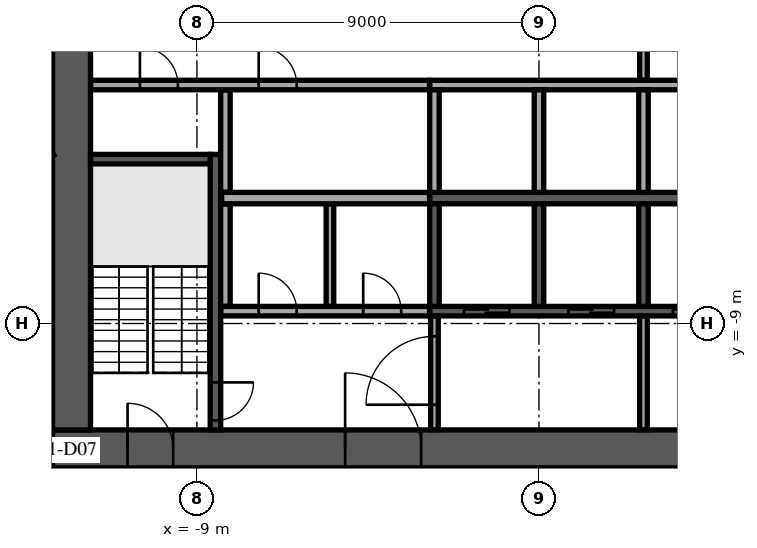
"""IFC4 building model, lengths in metres.
Left out: names, types, materials, properties, quantities, classifications, styles, units other than length and angle.
Written with IfcOpenShell. Run it as: python <this file> out.ifc"""

import sys

from ifc_helpers import new_model, si_unit, direction, frame, frame_2d, origin, place, context, subcontext, project, spatial, rectangle, extrude, element, fill, save


model = new_model("IFC4")
c1 = context("Model", 3, precision=1e-05, world=origin(), true_north=direction((0.0, 1.0)))
c2 = subcontext(c1, "Body", "Model", "MODEL_VIEW")
j1 = project(units=[si_unit("LENGTHUNIT", "METRE"), si_unit("PLANEANGLEUNIT", "RADIAN")], contexts=[c1])
p1 = place(None, origin())
s1 = spatial("IfcSite", under=j1, at=p1, CompositionType="ELEMENT")
p2 = place(p1, origin())
s2 = spatial("IfcBuilding", under=s1, at=p2, CompositionType="ELEMENT")
p3 = place(p2, frame((0.0, 0.0, 139.7)))
s3 = spatial("IfcBuildingStorey", under=s2, at=p3, CompositionType="ELEMENT", Elevation=139.7)
p4 = place(p3, frame((-12.8, -12.3, 0.0), z_axis=(0.0, 0.0, 1.0), x_axis=(1.0, 0.0, 0.0)))
e1 = element("IfcWall", 1, at=p4, inside=s3, PredefinedType="SHEAR", context=c2, shape_type="SweptSolid", body=[
    extrude(rectangle(XDim=25.6, YDim=1.0, at=frame_2d((12.8, 0.0))), origin(), (0.0, 0.0, 1.0), 3.6),
])
p5 = place(p4, frame((7.7, 0.0, 0.0)))
e2 = element("IfcOpeningElement", 2, at=p5, cuts=e1, PredefinedType="OPENING", context=c2, shape_type="SweptSolid", body=[
    extrude(rectangle(XDim=2.0, YDim=2.1, at=frame_2d((1.0, 1.05))), frame((0.0, 0.51, 0.0), z_axis=(0.0, -1.0, 0.0), x_axis=(1.0, 0.0, 0.0)), (0.0, 0.0, 1.0), 1.02),
])
p6 = place(p4, frame((17.825, 0.0, 0.0)))
e3 = element("IfcOpeningElement", 3, at=p6, cuts=e1, PredefinedType="OPENING", context=c2, shape_type="SweptSolid", body=[
    extrude(rectangle(XDim=1.2, YDim=2.1, at=frame_2d((0.6, 1.05))), frame((0.0, 0.51, 0.0), z_axis=(0.0, -1.0, 0.0), x_axis=(1.0, 0.0, 0.0)), (0.0, 0.0, 1.0), 1.02),
])
p7 = place(p4, frame((1.975, 0.0, 0.0)))
e4 = element("IfcOpeningElement", 4, at=p7, cuts=e1, PredefinedType="OPENING", context=c2, shape_type="SweptSolid", body=[
    extrude(rectangle(XDim=1.2, YDim=2.1, at=frame_2d((0.6, 1.05))), frame((0.0, 0.51, 0.0), z_axis=(0.0, -1.0, 0.0), x_axis=(1.0, 0.0, 0.0)), (0.0, 0.0, 1.0), 1.02),
])
p8 = place(p4, frame((22.425, 0.0, 0.0)))
e5 = element("IfcOpeningElement", 5, at=p8, cuts=e1, PredefinedType="OPENING", context=c2, shape_type="SweptSolid", body=[
    extrude(rectangle(XDim=1.2, YDim=2.1, at=frame_2d((0.6, 1.05))), frame((0.0, 0.51, 0.0), z_axis=(0.0, -1.0, 0.0), x_axis=(1.0, 0.0, 0.0)), (0.0, 0.0, 1.0), 1.02),
])
p9 = place(p3, frame((-12.3, -11.8, 0.0), z_axis=(0.0, 0.0, 1.0), x_axis=(0.0, 1.0, 0.0)))
e6 = element("IfcWall", 6, at=p9, inside=s3, PredefinedType="SHEAR", context=c2, shape_type="SweptSolid", body=[
    extrude(rectangle(XDim=23.6, YDim=1.0, at=frame_2d((11.8, 0.0))), origin(), (0.0, 0.0, 1.0), 3.6),
])
p10 = place(p9, frame((10.6, 0.0, 0.0)))
e7 = element("IfcOpeningElement", 7, at=p10, cuts=e6, PredefinedType="OPENING", context=c2, shape_type="SweptSolid", body=[
    extrude(rectangle(XDim=2.4, YDim=2.4, at=frame_2d((1.2, 1.2))), frame((0.0, 0.51, 0.0), z_axis=(0.0, -1.0, 0.0), x_axis=(1.0, 0.0, 0.0)), (0.0, 0.0, 1.0), 1.02),
])
p11 = place(p3, frame((-2.875, -5.7, 0.0), z_axis=(0.0, 0.0, 1.0), x_axis=(1.0, 0.0, 0.0)))
e8 = element("IfcWall", 8, at=p11, inside=s3, PredefinedType="SOLIDWALL", context=c2, shape_type="SweptSolid", body=[
    extrude(rectangle(XDim=11.25, YDim=0.3, at=frame_2d((5.625, 0.0))), origin(), (0.0, 0.0, 1.0), 3.6),
])
p12 = place(p3, frame((-2.875, -2.725, 0.0), z_axis=(0.0, 0.0, 1.0), x_axis=(1.0, 0.0, 0.0)))
e9 = element("IfcWall", 9, at=p12, inside=s3, PredefinedType="SOLIDWALL", context=c2, shape_type="SweptSolid", body=[
    extrude(rectangle(XDim=8.5, YDim=0.25, at=frame_2d((4.25, 0.0))), origin(), (0.0, 0.0, 1.0), 3.6),
])
for number, where, z_axis, x_axis in (
    (10, (-2.75, -5.55, 0.0), (0.0, 0.0, 1.0), (0.0, 1.0, 0.0)),
    (11, (0.0, -5.55, 0.0), (0.0, 0.0, 1.0), (0.0, 1.0, 0.0)),
    (12, (2.75, -5.55, 0.0), (0.0, 0.0, 1.0), (0.0, 1.0, 0.0)),
):
    element("IfcWall", number, at=place(p3, frame(where, z_axis=z_axis, x_axis=x_axis)), inside=s3, PredefinedType="SOLIDWALL", context=c2, shape_type="SweptSolid", body=[
        extrude(rectangle(XDim=2.7, YDim=0.25, at=frame_2d((1.35, 0.0))), origin(), (0.0, 0.0, 1.0), 3.6),
    ])
p13 = place(p3, frame((-2.875, -8.675, 0.0), z_axis=(0.0, 0.0, 1.0), x_axis=(1.0, 0.0, 0.0)))
e13 = element("IfcWall", 13, at=p13, inside=s3, PredefinedType="SOLIDWALL", context=c2, shape_type="SweptSolid", body=[
    extrude(rectangle(XDim=11.25, YDim=0.25, at=frame_2d((5.625, 0.0))), origin(), (0.0, 0.0, 1.0), 3.6),
])
p14 = place(p13, frame((0.9, 0.0, 0.0)))
e14 = element("IfcOpeningElement", 14, at=p14, cuts=e13, PredefinedType="OPENING", context=c2, shape_type="SweptSolid", body=[
    extrude(rectangle(XDim=1.2, YDim=2.1, at=frame_2d((0.6, 1.05))), frame((0.0, 0.135, 0.0), z_axis=(0.0, -1.0, 0.0), x_axis=(1.0, 0.0, 0.0)), (0.0, 0.0, 1.0), 0.27),
])
p15 = place(p13, frame((3.65, 0.0, 0.0)))
e15 = element("IfcOpeningElement", 15, at=p15, cuts=e13, PredefinedType="OPENING", context=c2, shape_type="SweptSolid", body=[
    extrude(rectangle(XDim=1.2, YDim=2.1, at=frame_2d((0.6, 1.05))), frame((0.0, 0.135, 0.0), z_axis=(0.0, -1.0, 0.0), x_axis=(1.0, 0.0, 0.0)), (0.0, 0.0, 1.0), 0.27),
])
p16 = place(p13, frame((6.4, 0.0, 0.0)))
e16 = element("IfcOpeningElement", 16, at=p16, cuts=e13, PredefinedType="OPENING", context=c2, shape_type="SweptSolid", body=[
    extrude(rectangle(XDim=1.2, YDim=2.1, at=frame_2d((0.6, 1.05))), frame((0.0, 0.135, 0.0), z_axis=(0.0, -1.0, 0.0), x_axis=(1.0, 0.0, 0.0)), (0.0, 0.0, 1.0), 0.27),
])
p17 = place(p13, frame((9.15, 0.0, 0.0)))
e17 = element("IfcOpeningElement", 17, at=p17, cuts=e13, PredefinedType="OPENING", context=c2, shape_type="SweptSolid", body=[
    extrude(rectangle(XDim=1.2, YDim=2.1, at=frame_2d((0.6, 1.05))), frame((0.0, 0.135, 0.0), z_axis=(0.0, -1.0, 0.0), x_axis=(1.0, 0.0, 0.0)), (0.0, 0.0, 1.0), 0.27),
])
for number, where, z_axis, x_axis in (
    (18, (-2.75, -8.55, 0.0), (0.0, 0.0, 1.0), (0.0, 1.0, 0.0)),
    (19, (0.0, -8.55, 0.0), (0.0, 0.0, 1.0), (0.0, 1.0, 0.0)),
    (20, (2.75, -8.55, 0.0), (0.0, 0.0, 1.0), (0.0, 1.0, 0.0)),
):
    element("IfcWall", number, at=place(p3, frame(where, z_axis=z_axis, x_axis=x_axis)), inside=s3, PredefinedType="SOLIDWALL", context=c2, shape_type="SweptSolid", body=[
        extrude(rectangle(XDim=2.7, YDim=0.25, at=frame_2d((1.35, 0.0))), origin(), (0.0, 0.0, 1.0), 3.6),
    ])
p18 = place(p3, frame((-8.512, -4.55, 0.0), z_axis=(0.0, 0.0, 1.0), x_axis=(0.0, -1.0, 0.0)))
e21 = element("IfcWall", 21, at=p18, inside=s3, PredefinedType="SOLIDWALL", context=c2, shape_type="SweptSolid", body=[
    extrude(rectangle(XDim=7.25, YDim=0.275, at=frame_2d((3.625, 0.0))), origin(), (0.0, 0.0, 1.0), 3.6),
])
p19 = place(p18, frame((6.0, 0.0, 0.0)))
e22 = element("IfcOpeningElement", 22, at=p19, cuts=e21, PredefinedType="OPENING", context=c2, shape_type="SweptSolid", body=[
    extrude(rectangle(XDim=1.0, YDim=2.1, at=frame_2d((0.5, 1.05))), frame((0.0, 0.147, 0.0), z_axis=(0.0, -1.0, 0.0), x_axis=(1.0, 0.0, 0.0)), (0.0, 0.0, 1.0), 0.295),
])
p20 = place(p3, frame((-8.65, -4.675, 0.0), z_axis=(0.0, 0.0, 1.0), x_axis=(-1.0, 0.0, 0.0)))
e23 = element("IfcWall", 23, at=p20, inside=s3, PredefinedType="SOLIDWALL", context=c2, shape_type="SweptSolid", body=[
    extrude(rectangle(XDim=3.15, YDim=0.25, at=frame_2d((1.575, 0.0))), origin(), (0.0, 0.0, 1.0), 3.6),
])
p21 = place(p3, frame((-2.75, -11.795, 0.0), z_axis=(0.0, 0.0, 1.0), x_axis=(0.0, 1.0, 0.0)))
e24 = element("IfcWall", 24, at=p21, inside=s3, PredefinedType="PARTITIONING", context=c2, shape_type="SweptSolid", body=[
    extrude(rectangle(XDim=2.99, YDim=0.2, at=frame_2d((1.495, 0.0))), origin(), (0.0, 0.0, 1.0), 3.6),
])
p22 = place(p21, frame((0.657, 0.0, 0.0)))
e25 = element("IfcOpeningElement", 25, at=p22, cuts=e24, PredefinedType="OPENING", context=c2, shape_type="SweptSolid", body=[
    extrude(rectangle(XDim=1.8, YDim=2.1, at=frame_2d((0.9, 1.05))), frame((0.0, 0.11, 0.0), z_axis=(0.0, -1.0, 0.0), x_axis=(1.0, 0.0, 0.0)), (0.0, 0.0, 1.0), 0.22),
])
p23 = place(p3, frame((2.75, -11.795, 0.0), z_axis=(0.0, 0.0, 1.0), x_axis=(0.0, 1.0, 0.0)))
e26 = element("IfcWall", 26, at=p23, inside=s3, PredefinedType="PARTITIONING", context=c2, shape_type="SweptSolid", body=[
    extrude(rectangle(XDim=2.99, YDim=0.2, at=frame_2d((1.495, 0.0))), origin(), (0.0, 0.0, 1.0), 3.6),
])
p24 = place(p3, frame((-8.37, -8.675, 0.0), z_axis=(0.0, 0.0, 1.0), x_axis=(1.0, 0.0, 0.0)))
e27 = element("IfcWall", 27, at=p24, inside=s3, PredefinedType="PARTITIONING", context=c2, shape_type="SweptSolid", body=[
    extrude(rectangle(XDim=5.49, YDim=0.25, at=frame_2d((2.745, 0.0))), origin(), (0.0, 0.0, 1.0), 3.6),
])
p25 = place(p24, frame((0.995, 0.0, 0.0)))
e28 = element("IfcOpeningElement", 28, at=p25, cuts=e27, PredefinedType="OPENING", context=c2, shape_type="SweptSolid", body=[
    extrude(rectangle(XDim=1.0, YDim=2.1, at=frame_2d((0.5, 1.05))), frame((0.0, 0.135, 0.0), z_axis=(0.0, -1.0, 0.0), x_axis=(1.0, 0.0, 0.0)), (0.0, 0.0, 1.0), 0.27),
])
p26 = place(p24, frame((3.745, 0.0, 0.0)))
e29 = element("IfcOpeningElement", 29, at=p26, cuts=e27, PredefinedType="OPENING", context=c2, shape_type="SweptSolid", body=[
    extrude(rectangle(XDim=1.0, YDim=2.1, at=frame_2d((0.5, 1.05))), frame((0.0, 0.135, 0.0), z_axis=(0.0, -1.0, 0.0), x_axis=(1.0, 0.0, 0.0)), (0.0, 0.0, 1.0), 0.27),
])
p27 = place(p3, frame((-8.25, -8.545, 0.0), z_axis=(0.0, 0.0, 1.0), x_axis=(0.0, 1.0, 0.0)))
e30 = element("IfcWall", 30, at=p27, inside=s3, PredefinedType="PARTITIONING", context=c2, shape_type="SweptSolid", body=[
    extrude(rectangle(XDim=2.69, YDim=0.25, at=frame_2d((1.345, 0.0))), origin(), (0.0, 0.0, 1.0), 3.6),
])
p28 = place(p3, frame((-5.5, -8.545, 0.0), z_axis=(0.0, 0.0, 1.0), x_axis=(0.0, 1.0, 0.0)))
e31 = element("IfcWall", 31, at=p28, inside=s3, PredefinedType="PARTITIONING", context=c2, shape_type="SweptSolid", body=[
    extrude(rectangle(XDim=2.69, YDim=0.2, at=frame_2d((1.345, 0.0))), origin(), (0.0, 0.0, 1.0), 3.6),
])
p29 = place(p3, frame((-8.35, -5.7, 0.0), z_axis=(0.0, 0.0, 1.0), x_axis=(1.0, 0.0, 0.0)))
e32 = element("IfcWall", 32, at=p29, inside=s3, PredefinedType="PARTITIONING", context=c2, shape_type="SweptSolid", body=[
    extrude(rectangle(XDim=5.47, YDim=0.3, at=frame_2d((2.735, 0.0))), origin(), (0.0, 0.0, 1.0), 3.6),
])
p30 = place(p3, frame((-8.25, -5.545, 0.0), z_axis=(0.0, 0.0, 1.0), x_axis=(0.0, 1.0, 0.0)))
e33 = element("IfcWall", 33, at=p30, inside=s3, PredefinedType="PARTITIONING", context=c2, shape_type="SweptSolid", body=[
    extrude(rectangle(XDim=2.69, YDim=0.25, at=frame_2d((1.345, 0.0))), origin(), (0.0, 0.0, 1.0), 3.6),
])
p31 = place(p3, frame((-11.795, -2.725, 0.0), z_axis=(0.0, 0.0, 1.0), x_axis=(1.0, 0.0, 0.0)))
e34 = element("IfcWall", 34, at=p31, inside=s3, PredefinedType="PARTITIONING", context=c2, shape_type="SweptSolid", body=[
    extrude(rectangle(XDim=8.915, YDim=0.25, at=frame_2d((4.458, 0.0))), origin(), (0.0, 0.0, 1.0), 3.6),
])
p32 = place(p31, frame((1.295, 0.0, 0.0)))
e35 = element("IfcOpeningElement", 35, at=p32, cuts=e34, PredefinedType="OPENING", context=c2, shape_type="SweptSolid", body=[
    extrude(rectangle(XDim=1.0, YDim=2.1, at=frame_2d((0.5, 1.05))), frame((0.0, 0.135, 0.0), z_axis=(0.0, -1.0, 0.0), x_axis=(1.0, 0.0, 0.0)), (0.0, 0.0, 1.0), 0.27),
])
p33 = place(p31, frame((4.42, 0.0, 0.0)))
e36 = element("IfcOpeningElement", 36, at=p33, cuts=e34, PredefinedType="OPENING", context=c2, shape_type="SweptSolid", body=[
    extrude(rectangle(XDim=1.0, YDim=2.1, at=frame_2d((0.5, 1.05))), frame((0.0, 0.135, 0.0), z_axis=(0.0, -1.0, 0.0), x_axis=(1.0, 0.0, 0.0)), (0.0, 0.0, 1.0), 0.27),
])
p34 = place(p3, frame((2.75, -2.595, 0.0), z_axis=(0.0, 0.0, 1.0), x_axis=(0.0, 1.0, 0.0)))
e37 = element("IfcWall", 37, at=p34, inside=s3, PredefinedType="PARTITIONING", context=c2, shape_type="SweptSolid", body=[
    extrude(rectangle(XDim=5.19, YDim=0.2, at=frame_2d((2.595, 0.0))), origin(), (0.0, 0.0, 1.0), 3.6),
])
p35 = place(p34, frame((1.395, 0.0, 0.0)))
e38 = element("IfcOpeningElement", 38, at=p35, cuts=e37, PredefinedType="OPENING", context=c2, shape_type="SweptSolid", body=[
    extrude(rectangle(XDim=2.4, YDim=2.4, at=frame_2d((1.2, 1.2))), frame((0.0, 0.11, 0.0), z_axis=(0.0, -1.0, 0.0), x_axis=(1.0, 0.0, 0.0)), (0.0, 0.0, 1.0), 0.22),
])
p36 = place(p3, frame((-9.103, -34.888, 0.0), z_axis=(0.0, 0.0, 1.0), x_axis=(0.874618897425, 0.484811081007, 0.0)))
e39 = element("IfcWall", 39, at=p36, inside=s3, PredefinedType="STANDARD", context=c2, shape_type="SweptSolid", body=[
    extrude(rectangle(XDim=49.751, YDim=0.6, at=frame_2d((24.876, 0.0))), origin(), (0.0, 0.0, 1.0), 3.6),
])
p37 = place(p36, frame((1.161, 0.0, 0.9)))
e40 = element("IfcOpeningElement", 40, at=p37, cuts=e39, PredefinedType="OPENING", context=c2, shape_type="SweptSolid", body=[
    extrude(rectangle(XDim=2.1, YDim=2.1, at=frame_2d((1.05, 1.05))), frame((0.0, 0.31, 0.0), z_axis=(0.0, -1.0, 0.0), x_axis=(1.0, 0.0, 0.0)), (0.0, 0.0, 1.0), 0.62),
])
p38 = place(p36, frame((5.644, 0.0, 0.9)))
e41 = element("IfcOpeningElement", 41, at=p38, cuts=e39, PredefinedType="OPENING", context=c2, shape_type="SweptSolid", body=[
    extrude(rectangle(XDim=2.1, YDim=2.1, at=frame_2d((1.05, 1.05))), frame((0.0, 0.31, 0.0), z_axis=(0.0, -1.0, 0.0), x_axis=(1.0, 0.0, 0.0)), (0.0, 0.0, 1.0), 0.62),
])
p39 = place(p36, frame((10.189, 0.0, 0.9)))
e42 = element("IfcOpeningElement", 42, at=p39, cuts=e39, PredefinedType="OPENING", context=c2, shape_type="SweptSolid", body=[
    extrude(rectangle(XDim=2.1, YDim=2.1, at=frame_2d((1.05, 1.05))), frame((0.0, 0.31, 0.0), z_axis=(0.0, -1.0, 0.0), x_axis=(1.0, 0.0, 0.0)), (0.0, 0.0, 1.0), 0.62),
])
p40 = place(p36, frame((14.735, 0.0, 0.9)))
e43 = element("IfcOpeningElement", 43, at=p40, cuts=e39, PredefinedType="OPENING", context=c2, shape_type="SweptSolid", body=[
    extrude(rectangle(XDim=2.1, YDim=2.1, at=frame_2d((1.05, 1.05))), frame((0.0, 0.31, 0.0), z_axis=(0.0, -1.0, 0.0), x_axis=(1.0, 0.0, 0.0)), (0.0, 0.0, 1.0), 0.62),
])
p41 = place(p36, frame((19.28, 0.0, 0.9)))
e44 = element("IfcOpeningElement", 44, at=p41, cuts=e39, PredefinedType="OPENING", context=c2, shape_type="SweptSolid", body=[
    extrude(rectangle(XDim=2.1, YDim=2.1, at=frame_2d((1.05, 1.05))), frame((0.0, 0.31, 0.0), z_axis=(0.0, -1.0, 0.0), x_axis=(1.0, 0.0, 0.0)), (0.0, 0.0, 1.0), 0.62),
])
p42 = place(p36, frame((23.826, 0.0, 0.9)))
e45 = element("IfcOpeningElement", 45, at=p42, cuts=e39, PredefinedType="OPENING", context=c2, shape_type="SweptSolid", body=[
    extrude(rectangle(XDim=2.1, YDim=2.1, at=frame_2d((1.05, 1.05))), frame((0.0, 0.31, 0.0), z_axis=(0.0, -1.0, 0.0), x_axis=(1.0, 0.0, 0.0)), (0.0, 0.0, 1.0), 0.62),
])
p43 = place(p36, frame((28.371, 0.0, 0.9)))
e46 = element("IfcOpeningElement", 46, at=p43, cuts=e39, PredefinedType="OPENING", context=c2, shape_type="SweptSolid", body=[
    extrude(rectangle(XDim=2.1, YDim=2.1, at=frame_2d((1.05, 1.05))), frame((0.0, 0.31, 0.0), z_axis=(0.0, -1.0, 0.0), x_axis=(1.0, 0.0, 0.0)), (0.0, 0.0, 1.0), 0.62),
])
p44 = place(p36, frame((32.917, 0.0, 0.9)))
e47 = element("IfcOpeningElement", 47, at=p44, cuts=e39, PredefinedType="OPENING", context=c2, shape_type="SweptSolid", body=[
    extrude(rectangle(XDim=2.1, YDim=2.1, at=frame_2d((1.05, 1.05))), frame((0.0, 0.31, 0.0), z_axis=(0.0, -1.0, 0.0), x_axis=(1.0, 0.0, 0.0)), (0.0, 0.0, 1.0), 0.62),
])
p45 = place(p36, frame((37.462, 0.0, 0.9)))
e48 = element("IfcOpeningElement", 48, at=p45, cuts=e39, PredefinedType="OPENING", context=c2, shape_type="SweptSolid", body=[
    extrude(rectangle(XDim=2.1, YDim=2.1, at=frame_2d((1.05, 1.05))), frame((0.0, 0.31, 0.0), z_axis=(0.0, -1.0, 0.0), x_axis=(1.0, 0.0, 0.0)), (0.0, 0.0, 1.0), 0.62),
])
p46 = place(p36, frame((42.008, 0.0, 0.9)))
e49 = element("IfcOpeningElement", 49, at=p46, cuts=e39, PredefinedType="OPENING", context=c2, shape_type="SweptSolid", body=[
    extrude(rectangle(XDim=2.1, YDim=2.1, at=frame_2d((1.05, 1.05))), frame((0.0, 0.31, 0.0), z_axis=(0.0, -1.0, 0.0), x_axis=(1.0, 0.0, 0.0)), (0.0, 0.0, 1.0), 0.62),
])
p47 = place(p36, frame((46.491, 0.0, 0.9)))
e50 = element("IfcOpeningElement", 50, at=p47, cuts=e39, PredefinedType="OPENING", context=c2, shape_type="SweptSolid", body=[
    extrude(rectangle(XDim=2.1, YDim=2.1, at=frame_2d((1.05, 1.05))), frame((0.0, 0.31, 0.0), z_axis=(0.0, -1.0, 0.0), x_axis=(1.0, 0.0, 0.0)), (0.0, 0.0, 1.0), 0.62),
])
p48 = place(p3, frame((-18.893, -7.882, 0.0), z_axis=(0.0, 0.0, 1.0), x_axis=(0.874670900287, 0.484717253861, 0.0)))
e51 = element("IfcWall", 51, at=p48, inside=s3, PredefinedType="PARTITIONING", context=c2, shape_type="SweptSolid", body=[
    extrude(rectangle(XDim=6.966, YDim=0.15, at=frame_2d((3.483, 0.0))), origin(), (0.0, 0.0, 1.0), 3.15),
])
p49 = place(p3, frame((-4.484, -24.462, 0.0), z_axis=(0.0, 0.0, 1.0), x_axis=(0.874618059696, 0.484812592301, 0.0)))
e52 = element("IfcWall", 52, at=p49, inside=s3, PredefinedType="PARTITIONING", context=c2, shape_type="SweptSolid", body=[
    extrude(rectangle(XDim=31.638, YDim=0.15, at=frame_2d((15.819, 0.0))), origin(), (0.0, 0.0, 1.0), 3.15),
])
p50 = place(p49, frame((9.25, 0.0, 0.0)))
e53 = element("IfcOpeningElement", 53, at=p50, cuts=e52, PredefinedType="OPENING", context=c2, shape_type="SweptSolid", body=[
    extrude(rectangle(XDim=1.0, YDim=2.1, at=frame_2d((0.5, 1.05))), frame((0.0, 0.085, 0.0), z_axis=(0.0, -1.0, 0.0), x_axis=(1.0, 0.0, 0.0)), (0.0, 0.0, 1.0), 0.17),
])
p51 = place(p49, frame((19.239, 0.0, 0.0)))
e54 = element("IfcOpeningElement", 54, at=p51, cuts=e52, PredefinedType="OPENING", context=c2, shape_type="SweptSolid", body=[
    extrude(rectangle(XDim=1.0, YDim=2.1, at=frame_2d((0.5, 1.05))), frame((0.0, 0.085, 0.0), z_axis=(0.0, -1.0, 0.0), x_axis=(1.0, 0.0, 0.0)), (0.0, 0.0, 1.0), 0.17),
])
p52 = place(p49, frame((24.772, 0.0, 0.0)))
e55 = element("IfcOpeningElement", 55, at=p52, cuts=e52, PredefinedType="OPENING", context=c2, shape_type="SweptSolid", body=[
    extrude(rectangle(XDim=1.0, YDim=2.1, at=frame_2d((0.5, 1.05))), frame((0.0, 0.085, 0.0), z_axis=(0.0, -1.0, 0.0), x_axis=(1.0, 0.0, 0.0)), (0.0, 0.0, 1.0), 0.17),
])
p53 = place(p5, origin())
e56 = element("IfcDoor", 56, at=p53, inside=s3, OperationType="SINGLE_SWING_LEFT", PredefinedType="DOOR", context=c2, shape_type="SweptSolid", body=[
    extrude(rectangle(XDim=2.0, YDim=2.1, at=frame_2d((1.0, 1.05))), frame((0.0, 0.025, 0.0), z_axis=(0.0, -1.0, 0.0), x_axis=(1.0, 0.0, 0.0)), (0.0, 0.0, 1.0), 0.05),
])
fill(e2, e56)
p54 = place(p7, origin())
e57 = element("IfcDoor", 57, at=p54, inside=s3, OperationType="SINGLE_SWING_LEFT", PredefinedType="DOOR", context=c2, shape_type="SweptSolid", body=[
    extrude(rectangle(XDim=1.2, YDim=2.1, at=frame_2d((0.6, 1.05))), frame((0.0, 0.025, 0.0), z_axis=(0.0, -1.0, 0.0), x_axis=(1.0, 0.0, 0.0)), (0.0, 0.0, 1.0), 0.05),
])
fill(e4, e57)
p55 = place(p14, origin())
e58 = element("IfcDoor", 58, at=p55, inside=s3, OperationType="DOUBLE_DOOR_SLIDING", PredefinedType="DOOR", context=c2, shape_type="SweptSolid", body=[
    extrude(rectangle(XDim=1.2, YDim=2.1, at=frame_2d((0.6, 1.05))), frame((0.0, 0.025, 0.0), z_axis=(0.0, -1.0, 0.0), x_axis=(1.0, 0.0, 0.0)), (0.0, 0.0, 1.0), 0.05),
])
fill(e14, e58)
p56 = place(p15, origin())
e59 = element("IfcDoor", 59, at=p56, inside=s3, OperationType="DOUBLE_DOOR_SLIDING", PredefinedType="DOOR", context=c2, shape_type="SweptSolid", body=[
    extrude(rectangle(XDim=1.2, YDim=2.1, at=frame_2d((0.6, 1.05))), frame((0.0, 0.025, 0.0), z_axis=(0.0, -1.0, 0.0), x_axis=(1.0, 0.0, 0.0)), (0.0, 0.0, 1.0), 0.05),
])
fill(e15, e59)
p57 = place(p16, origin())
e60 = element("IfcDoor", 60, at=p57, inside=s3, OperationType="DOUBLE_DOOR_SLIDING", PredefinedType="DOOR", context=c2, shape_type="SweptSolid", body=[
    extrude(rectangle(XDim=1.2, YDim=2.1, at=frame_2d((0.6, 1.05))), frame((0.0, 0.025, 0.0), z_axis=(0.0, -1.0, 0.0), x_axis=(1.0, 0.0, 0.0)), (0.0, 0.0, 1.0), 0.05),
])
fill(e16, e60)
p58 = place(p19, origin())
e61 = element("IfcDoor", 61, at=p58, inside=s3, OperationType="SINGLE_SWING_LEFT", PredefinedType="DOOR", context=c2, shape_type="SweptSolid", body=[
    extrude(rectangle(XDim=1.0, YDim=2.1, at=frame_2d((0.5, 1.05))), frame((0.0, 0.025, 0.0), z_axis=(0.0, -1.0, 0.0), x_axis=(1.0, 0.0, 0.0)), (0.0, 0.0, 1.0), 0.05),
])
fill(e22, e61)
p59 = place(p25, origin())
e62 = element("IfcDoor", 62, at=p59, inside=s3, OperationType="SINGLE_SWING_LEFT", PredefinedType="DOOR", context=c2, shape_type="SweptSolid", body=[
    extrude(rectangle(XDim=1.0, YDim=2.1, at=frame_2d((0.5, 1.05))), frame((0.0, 0.025, 0.0), z_axis=(0.0, -1.0, 0.0), x_axis=(1.0, 0.0, 0.0)), (0.0, 0.0, 1.0), 0.05),
])
fill(e28, e62)
p60 = place(p26, origin())
e63 = element("IfcDoor", 63, at=p60, inside=s3, OperationType="SINGLE_SWING_LEFT", PredefinedType="DOOR", context=c2, shape_type="SweptSolid", body=[
    extrude(rectangle(XDim=1.0, YDim=2.1, at=frame_2d((0.5, 1.05))), frame((0.0, 0.025, 0.0), z_axis=(0.0, -1.0, 0.0), x_axis=(1.0, 0.0, 0.0)), (0.0, 0.0, 1.0), 0.05),
])
fill(e29, e63)
p61 = place(p32, origin())
e64 = element("IfcDoor", 64, at=p61, inside=s3, OperationType="SINGLE_SWING_LEFT", PredefinedType="DOOR", context=c2, shape_type="SweptSolid", body=[
    extrude(rectangle(XDim=1.0, YDim=2.1, at=frame_2d((0.5, 1.05))), frame((0.0, 0.025, 0.0), z_axis=(0.0, -1.0, 0.0), x_axis=(1.0, 0.0, 0.0)), (0.0, 0.0, 1.0), 0.05),
])
fill(e35, e64)
p62 = place(p33, origin())
e65 = element("IfcDoor", 65, at=p62, inside=s3, OperationType="SINGLE_SWING_LEFT", PredefinedType="DOOR", context=c2, shape_type="SweptSolid", body=[
    extrude(rectangle(XDim=1.0, YDim=2.1, at=frame_2d((0.5, 1.05))), frame((0.0, 0.025, 0.0), z_axis=(0.0, -1.0, 0.0), x_axis=(1.0, 0.0, 0.0)), (0.0, 0.0, 1.0), 0.05),
])
fill(e36, e65)
p63 = place(p22, origin())
e66 = element("IfcDoor", 66, at=p63, inside=s3, OperationType="SINGLE_SWING_LEFT", PredefinedType="DOOR", context=c2, shape_type="SweptSolid", body=[
    extrude(rectangle(XDim=1.8, YDim=2.1, at=frame_2d((0.9, 1.05))), frame((0.0, 0.025, 0.0), z_axis=(0.0, -1.0, 0.0), x_axis=(1.0, 0.0, 0.0)), (0.0, 0.0, 1.0), 0.05),
])
fill(e25, e66)
save(model, sys.argv[1])
